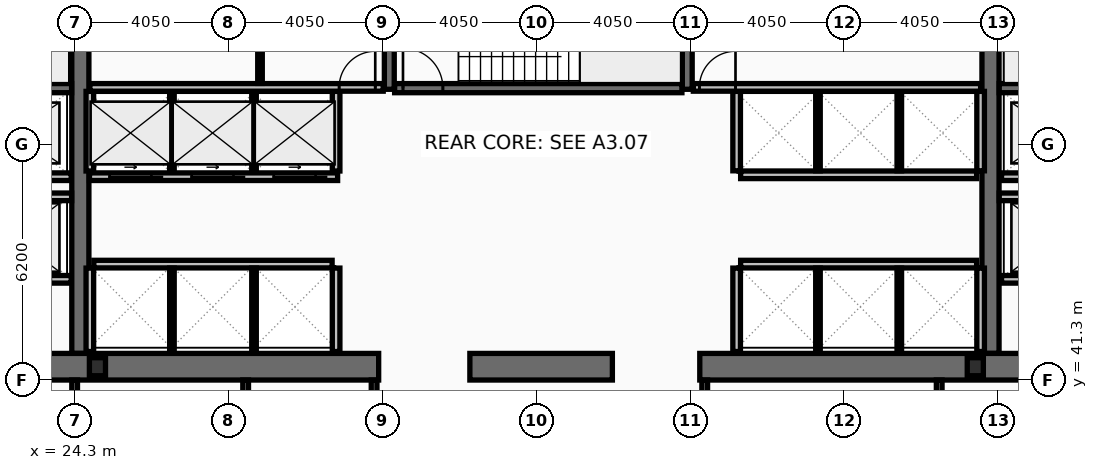
"""IFC4 building model, lengths in metres.
Left out: names, types, materials, properties, quantities, classifications, styles, units other than length and angle.
Written with IfcOpenShell. Run it as: python <this file> out.ifc"""

import sys

from ifc_helpers import new_model, si_unit, direction, frame, frame_2d, origin, origin_2d, place, context, subcontext, project, spatial, rectangle, i_section, extrude, element, fill, save


model = new_model("IFC4")
c1 = context("Model", 3, precision=1e-05, world=origin(), true_north=direction((0.0, 1.0)))
c2 = subcontext(c1, "Body", "Model", "MODEL_VIEW")
j1 = project(units=[si_unit("LENGTHUNIT", "METRE"), si_unit("PLANEANGLEUNIT", "RADIAN")], contexts=[c1])
p1 = place(None, origin())
s1 = spatial("IfcSite", under=j1, at=p1, CompositionType="ELEMENT")
p2 = place(p1, origin())
s2 = spatial("IfcBuilding", under=s1, at=p2, CompositionType="ELEMENT")
p3 = place(p2, frame((0.0, 0.0, 90.6)))
s3 = spatial("IfcBuildingStorey", under=s2, at=p3, CompositionType="ELEMENT", Elevation=90.6)
for number, where, z_axis, x_axis in (
    (1, (24.45, 42.0, 0.0), (0.0, 0.0, 1.0), (0.0, 1.0, 0.0)),
    (2, (48.4, 42.0, 0.0), (0.0, 0.0, 1.0), (0.0, 1.0, 0.0)),
):
    element("IfcWall", number, at=place(p3, frame(where, z_axis=z_axis, x_axis=x_axis)), inside=s3, PredefinedType="SHEAR", context=c2, shape_type="SweptSolid", body=[
        extrude(rectangle(XDim=11.0, YDim=0.45, at=frame_2d((5.5, 0.0))), origin(), (0.0, 0.0, 1.0), 3.82),
    ])
p4 = place(p3, frame((32.3, 41.65, 0.0), z_axis=(0.0, 0.0, 1.0), x_axis=(-1.0, 0.0, 0.0)))
e3 = element("IfcWall", 3, at=p4, inside=s3, PredefinedType="SHEAR", context=c2, shape_type="SweptSolid", body=[
    extrude(rectangle(XDim=11.45, YDim=0.7, at=frame_2d((5.725, 0.0))), origin(), (0.0, 0.0, 1.0), 3.82),
])
p5 = place(p3, frame((38.45, 41.65, 0.0), z_axis=(0.0, 0.0, 1.0), x_axis=(-1.0, 0.0, 0.0)))
e4 = element("IfcWall", 4, at=p5, inside=s3, PredefinedType="SHEAR", context=c2, shape_type="SweptSolid", body=[
    extrude(rectangle(XDim=3.75, YDim=0.7, at=frame_2d((1.875, 0.0))), origin(), (0.0, 0.0, 1.0), 3.82),
])
p6 = place(p3, frame((52.05, 41.65, 0.0), z_axis=(0.0, 0.0, 1.0), x_axis=(-1.0, 0.0, 0.0)))
e5 = element("IfcWall", 5, at=p6, inside=s3, PredefinedType="SHEAR", context=c2, shape_type="SweptSolid", body=[
    extrude(rectangle(XDim=11.3, YDim=0.7, at=frame_2d((5.65, 0.0))), origin(), (0.0, 0.0, 1.0), 3.82),
])
for number, where, z_axis, x_axis in (
    (6, (32.58, 48.95, 0.0), (0.0, 0.0, 1.0), (0.0, 1.0, 0.0)),
    (7, (40.42, 48.95, 0.0), (0.0, 0.0, 1.0), (0.0, 1.0, 0.0)),
):
    element("IfcWall", number, at=place(p3, frame(where, z_axis=z_axis, x_axis=x_axis)), inside=s3, PredefinedType="SHEAR", context=c2, shape_type="SweptSolid", body=[
        extrude(rectangle(XDim=4.05, YDim=0.26, at=frame_2d((2.025, 0.0))), origin(), (0.0, 0.0, 1.0), 3.82),
    ])
p7 = place(p3, frame((16.9, 48.98, 0.0), z_axis=(0.0, 0.0, 1.0), x_axis=(1.0, 0.0, 0.0)))
e8 = element("IfcWall", 8, at=p7, inside=s3, PredefinedType="SHEAR", context=c2, shape_type="SweptSolid", body=[
    extrude(rectangle(XDim=7.32, YDim=0.24, at=frame_2d((3.66, 0.0))), origin(), (0.0, 0.0, 1.0), 3.82),
])
p8 = place(p7, frame((0.22, 0.0, 0.0)))
e9 = element("IfcOpeningElement", 9, at=p8, cuts=e8, PredefinedType="OPENING", context=c2, shape_type="SweptSolid", body=[
    extrude(rectangle(XDim=1.05, YDim=2.15, at=frame_2d((0.525, 1.075))), frame((0.0, 0.13, 0.0), z_axis=(0.0, -1.0, 0.0), x_axis=(1.0, 0.0, 0.0)), (0.0, 0.0, 1.0), 0.26),
])
p9 = place(p3, frame((48.63, 48.98, 0.0), z_axis=(0.0, 0.0, 1.0), x_axis=(1.0, 0.0, 0.0)))
e10 = element("IfcWall", 10, at=p9, inside=s3, PredefinedType="SHEAR", context=c2, shape_type="SweptSolid", body=[
    extrude(rectangle(XDim=7.37, YDim=0.24, at=frame_2d((3.685, 0.0))), origin(), (0.0, 0.0, 1.0), 3.82),
])
p10 = place(p9, frame((6.1, 0.0, 0.0)))
e11 = element("IfcOpeningElement", 11, at=p10, cuts=e10, PredefinedType="OPENING", context=c2, shape_type="SweptSolid", body=[
    extrude(rectangle(XDim=1.05, YDim=2.15, at=frame_2d((0.525, 1.075))), frame((0.0, 0.13, 0.0), z_axis=(0.0, -1.0, 0.0), x_axis=(1.0, 0.0, 0.0)), (0.0, 0.0, 1.0), 0.26),
])
p11 = place(p3, frame((32.72, 48.98, 0.0), z_axis=(0.0, 0.0, 1.0), x_axis=(1.0, 0.0, 0.0)))
e12 = element("IfcWall", 12, at=p11, inside=s3, PredefinedType="SHEAR", context=c2, shape_type="SweptSolid", body=[
    extrude(rectangle(XDim=7.56, YDim=0.24, at=frame_2d((3.78, 0.0))), origin(), (0.0, 0.0, 1.0), 3.82),
])
p12 = place(p11, frame((0.22, 0.0, 0.0)))
e13 = element("IfcOpeningElement", 13, at=p12, cuts=e12, PredefinedType="OPENING", context=c2, shape_type="SweptSolid", body=[
    extrude(rectangle(XDim=1.05, YDim=2.15, at=frame_2d((0.525, 1.075))), frame((0.0, 0.13, 0.0), z_axis=(0.0, -1.0, 0.0), x_axis=(1.0, 0.0, 0.0)), (0.0, 0.0, 1.0), 0.26),
])
for number, where, z_axis, x_axis in (
    (14, (24.9, 41.65, 0.0), (0.0, 0.0, 1.0), (1.0, 0.0, 0.0)),
    (15, (48.0, 41.65, 0.0), (0.0, 0.0, 1.0), (1.0, 0.0, 0.0)),
):
    element("IfcColumn", number, at=place(p3, frame(where, z_axis=z_axis, x_axis=x_axis)), inside=s3, PredefinedType="COLUMN", context=c2, shape_type="SweptSolid", body=[
        extrude(i_section(OverallWidth=0.424, OverallDepth=0.474, WebThickness=0.048, FlangeThickness=0.077, at=origin_2d()), origin(), (0.0, 0.0, 1.0), 4.0),
    ])
p13 = place(p3, frame((51.61, 43.95, 0.0), z_axis=(0.0, 0.0, 1.0), x_axis=(-1.0, 0.0, 0.0)))
e16 = element("IfcWall", 16, at=p13, inside=s3, PredefinedType="PARTITIONING", context=c2, shape_type="SweptSolid", body=[
    extrude(rectangle(XDim=2.92, YDim=0.2, at=frame_2d((1.46, 0.0))), origin(), (0.0, 0.0, 1.0), 3.82),
])
p14 = place(p13, frame((0.81, 0.0, 0.0)))
e17 = element("IfcOpeningElement", 17, at=p14, cuts=e16, PredefinedType="OPENING", context=c2, shape_type="SweptSolid", body=[
    extrude(rectangle(XDim=1.3, YDim=2.18, at=frame_2d((0.65, 1.09))), frame((0.0, 0.11, 0.0), z_axis=(0.0, -1.0, 0.0), x_axis=(1.0, 0.0, 0.0)), (0.0, 0.0, 1.0), 0.22),
])
p15 = place(p3, frame((24.21, 43.95, 0.0), z_axis=(0.0, 0.0, 1.0), x_axis=(-1.0, 0.0, 0.0)))
e18 = element("IfcWall", 18, at=p15, inside=s3, PredefinedType="PARTITIONING", context=c2, shape_type="SweptSolid", body=[
    extrude(rectangle(XDim=2.97, YDim=0.2, at=frame_2d((1.485, 0.0))), origin(), (0.0, 0.0, 1.0), 3.82),
])
p16 = place(p15, frame((0.86, 0.0, 0.0)))
e19 = element("IfcOpeningElement", 19, at=p16, cuts=e18, PredefinedType="OPENING", context=c2, shape_type="SweptSolid", body=[
    extrude(rectangle(XDim=1.3, YDim=2.18, at=frame_2d((0.65, 1.09))), frame((0.0, 0.11, 0.0), z_axis=(0.0, -1.0, 0.0), x_axis=(1.0, 0.0, 0.0)), (0.0, 0.0, 1.0), 0.22),
])
p17 = place(p3, frame((51.61, 46.65, 0.0), z_axis=(0.0, 0.0, 1.0), x_axis=(-1.0, 0.0, 0.0)))
e20 = element("IfcWall", 20, at=p17, inside=s3, PredefinedType="PARTITIONING", context=c2, shape_type="SweptSolid", body=[
    extrude(rectangle(XDim=2.92, YDim=0.2, at=frame_2d((1.46, 0.0))), origin(), (0.0, 0.0, 1.0), 3.82),
])
p18 = place(p17, frame((0.86, 0.0, 0.0)))
e21 = element("IfcOpeningElement", 21, at=p18, cuts=e20, PredefinedType="OPENING", context=c2, shape_type="SweptSolid", body=[
    extrude(rectangle(XDim=1.2, YDim=2.18, at=frame_2d((0.6, 1.09))), frame((0.0, 0.11, 0.0), z_axis=(0.0, -1.0, 0.0), x_axis=(1.0, 0.0, 0.0)), (0.0, 0.0, 1.0), 0.22),
])
p19 = place(p3, frame((24.21, 46.65, 0.0), z_axis=(0.0, 0.0, 1.0), x_axis=(-1.0, 0.0, 0.0)))
e22 = element("IfcWall", 22, at=p19, inside=s3, PredefinedType="PARTITIONING", context=c2, shape_type="SweptSolid", body=[
    extrude(rectangle(XDim=2.97, YDim=0.2, at=frame_2d((1.485, 0.0))), origin(), (0.0, 0.0, 1.0), 3.82),
])
p20 = place(p19, frame((0.91, 0.0, 0.0)))
e23 = element("IfcOpeningElement", 23, at=p20, cuts=e22, PredefinedType="OPENING", context=c2, shape_type="SweptSolid", body=[
    extrude(rectangle(XDim=1.2, YDim=2.18, at=frame_2d((0.6, 1.09))), frame((0.0, 0.11, 0.0), z_axis=(0.0, -1.0, 0.0), x_axis=(1.0, 0.0, 0.0)), (0.0, 0.0, 1.0), 0.22),
])
p21 = place(p3, frame((31.22, 46.65, 0.0), z_axis=(0.0, 0.0, 1.0), x_axis=(-1.0, 0.0, 0.0)))
e24 = element("IfcWall", 24, at=p21, inside=s3, PredefinedType="PARTITIONING", context=c2, shape_type="SweptSolid", body=[
    extrude(rectangle(XDim=6.53, YDim=0.2, at=frame_2d((3.265, 0.0))), origin(), (0.0, 0.0, 1.0), 3.82),
])
p22 = place(p21, frame((4.9, 0.0, 0.0)))
e25 = element("IfcOpeningElement", 25, at=p22, cuts=e24, PredefinedType="OPENING", context=c2, shape_type="SweptSolid", body=[
    extrude(rectangle(XDim=1.1, YDim=2.18, at=frame_2d((0.55, 1.09))), frame((0.0, 0.11, 0.0), z_axis=(0.0, -1.0, 0.0), x_axis=(1.0, 0.0, 0.0)), (0.0, 0.0, 1.0), 0.22),
])
p23 = place(p21, frame((2.74, 0.0, 0.0)))
e26 = element("IfcOpeningElement", 26, at=p23, cuts=e24, PredefinedType="OPENING", context=c2, shape_type="SweptSolid", body=[
    extrude(rectangle(XDim=1.1, YDim=2.18, at=frame_2d((0.55, 1.09))), frame((0.0, 0.11, 0.0), z_axis=(0.0, -1.0, 0.0), x_axis=(1.0, 0.0, 0.0)), (0.0, 0.0, 1.0), 0.22),
])
p24 = place(p21, frame((0.58, 0.0, 0.0)))
e27 = element("IfcOpeningElement", 27, at=p24, cuts=e24, PredefinedType="OPENING", context=c2, shape_type="SweptSolid", body=[
    extrude(rectangle(XDim=1.1, YDim=2.18, at=frame_2d((0.55, 1.09))), frame((0.0, 0.11, 0.0), z_axis=(0.0, -1.0, 0.0), x_axis=(1.0, 0.0, 0.0)), (0.0, 0.0, 1.0), 0.22),
])
p25 = place(p3, frame((21.2, 46.12, 0.0), z_axis=(0.0, 0.0, 1.0), x_axis=(1.0, 0.0, 0.0)))
e28 = element("IfcWall", 28, at=p25, inside=s3, PredefinedType="PARTITIONING", context=c2, shape_type="SweptSolid", body=[
    extrude(rectangle(XDim=3.02, YDim=0.2, at=frame_2d((1.51, 0.0))), origin(), (0.0, 0.0, 1.0), 3.82),
])
p26 = place(p3, frame((48.63, 46.12, 0.0), z_axis=(0.0, 0.0, 1.0), x_axis=(1.0, 0.0, 0.0)))
e29 = element("IfcWall", 29, at=p26, inside=s3, PredefinedType="PARTITIONING", context=c2, shape_type="SweptSolid", body=[
    extrude(rectangle(XDim=3.07, YDim=0.2, at=frame_2d((1.535, 0.0))), origin(), (0.0, 0.0, 1.0), 3.82),
])
for number, where, z_axis, x_axis in (
    (30, (24.7, 46.8, 0.0), (0.0, 0.0, 1.0), (0.0, 1.0, 0.0)),
    (31, (31.18, 46.8, 0.0), (0.0, 0.0, 1.0), (0.0, 1.0, 0.0)),
):
    element("IfcWall", number, at=place(p3, frame(where, z_axis=z_axis, x_axis=x_axis)), inside=s3, PredefinedType="PARTITIONING", context=c2, shape_type="SweptSolid", body=[
        extrude(rectangle(XDim=2.095, YDim=0.2, at=frame_2d((1.047, 0.0))), origin(), (0.0, 0.0, 1.0), 3.82),
    ])
for number, where, z_axis, x_axis in (
    (32, (26.86, 46.8, 0.0), (0.0, 0.0, 1.0), (0.0, 1.0, 0.0)),
    (33, (29.02, 46.8, 0.0), (0.0, 0.0, 1.0), (0.0, 1.0, 0.0)),
):
    element("IfcWall", number, at=place(p3, frame(where, z_axis=z_axis, x_axis=x_axis)), inside=s3, PredefinedType="PARTITIONING", context=c2, shape_type="SweptSolid", body=[
        extrude(rectangle(XDim=2.095, YDim=0.12, at=frame_2d((1.047, 0.0))), origin(), (0.0, 0.0, 1.0), 3.82),
    ])
p27 = place(p3, frame((24.805, 44.35, 0.0), z_axis=(0.0, 0.0, 1.0), x_axis=(1.0, 0.0, 0.0)))
e34 = element("IfcWall", 34, at=p27, inside=s3, PredefinedType="PARTITIONING", context=c2, shape_type="SweptSolid", body=[
    extrude(rectangle(XDim=6.27, YDim=0.2, at=frame_2d((3.135, 0.0))), origin(), (0.0, 0.0, 1.0), 3.82),
])
for number, where, z_axis, x_axis in (
    (35, (24.7, 42.05, 0.0), (0.0, 0.0, 1.0), (0.0, 1.0, 0.0)),
    (36, (31.18, 42.05, 0.0), (0.0, 0.0, 1.0), (0.0, 1.0, 0.0)),
):
    element("IfcWall", number, at=place(p3, frame(where, z_axis=z_axis, x_axis=x_axis)), inside=s3, PredefinedType="PARTITIONING", context=c2, shape_type="SweptSolid", body=[
        extrude(rectangle(XDim=2.195, YDim=0.2, at=frame_2d((1.098, 0.0))), origin(), (0.0, 0.0, 1.0), 3.82),
    ])
for number, where, z_axis, x_axis in (
    (37, (26.86, 42.05, 0.0), (0.0, 0.0, 1.0), (0.0, 1.0, 0.0)),
    (38, (29.02, 42.05, 0.0), (0.0, 0.0, 1.0), (0.0, 1.0, 0.0)),
):
    element("IfcWall", number, at=place(p3, frame(where, z_axis=z_axis, x_axis=x_axis)), inside=s3, PredefinedType="PARTITIONING", context=c2, shape_type="SweptSolid", body=[
        extrude(rectangle(XDim=2.195, YDim=0.12, at=frame_2d((1.098, 0.0))), origin(), (0.0, 0.0, 1.0), 3.82),
    ])
p28 = place(p3, frame((41.825, 46.7, 0.0), z_axis=(0.0, 0.0, 1.0), x_axis=(1.0, 0.0, 0.0)))
e39 = element("IfcWall", 39, at=p28, inside=s3, PredefinedType="PARTITIONING", context=c2, shape_type="SweptSolid", body=[
    extrude(rectangle(XDim=6.21, YDim=0.2, at=frame_2d((3.105, 0.0))), origin(), (0.0, 0.0, 1.0), 3.82),
])
for number, where, z_axis, x_axis in (
    (40, (41.72, 46.805, 0.0), (0.0, 0.0, 1.0), (0.0, 1.0, 0.0)),
    (41, (48.14, 46.805, 0.0), (0.0, 0.0, 1.0), (0.0, 1.0, 0.0)),
):
    element("IfcWall", number, at=place(p3, frame(where, z_axis=z_axis, x_axis=x_axis)), inside=s3, PredefinedType="PARTITIONING", context=c2, shape_type="SweptSolid", body=[
        extrude(rectangle(XDim=2.09, YDim=0.2, at=frame_2d((1.045, 0.0))), origin(), (0.0, 0.0, 1.0), 3.82),
    ])
for number, where, z_axis, x_axis in (
    (42, (43.86, 46.805, 0.0), (0.0, 0.0, 1.0), (0.0, 1.0, 0.0)),
    (43, (46.0, 46.805, 0.0), (0.0, 0.0, 1.0), (0.0, 1.0, 0.0)),
):
    element("IfcWall", number, at=place(p3, frame(where, z_axis=z_axis, x_axis=x_axis)), inside=s3, PredefinedType="PARTITIONING", context=c2, shape_type="SweptSolid", body=[
        extrude(rectangle(XDim=2.09, YDim=0.12, at=frame_2d((1.045, 0.0))), origin(), (0.0, 0.0, 1.0), 3.82),
    ])
p29 = place(p3, frame((41.825, 44.35, 0.0), z_axis=(0.0, 0.0, 1.0), x_axis=(1.0, 0.0, 0.0)))
e44 = element("IfcWall", 44, at=p29, inside=s3, PredefinedType="PARTITIONING", context=c2, shape_type="SweptSolid", body=[
    extrude(rectangle(XDim=6.21, YDim=0.2, at=frame_2d((3.105, 0.0))), origin(), (0.0, 0.0, 1.0), 3.82),
])
for number, where, z_axis, x_axis in (
    (45, (41.72, 42.05, 0.0), (0.0, 0.0, 1.0), (0.0, 1.0, 0.0)),
    (46, (48.14, 42.05, 0.0), (0.0, 0.0, 1.0), (0.0, 1.0, 0.0)),
):
    element("IfcWall", number, at=place(p3, frame(where, z_axis=z_axis, x_axis=x_axis)), inside=s3, PredefinedType="PARTITIONING", context=c2, shape_type="SweptSolid", body=[
        extrude(rectangle(XDim=2.195, YDim=0.2, at=frame_2d((1.098, 0.0))), origin(), (0.0, 0.0, 1.0), 3.82),
    ])
for number, where, z_axis, x_axis in (
    (47, (43.86, 42.05, 0.0), (0.0, 0.0, 1.0), (0.0, 1.0, 0.0)),
    (48, (46.0, 42.05, 0.0), (0.0, 0.0, 1.0), (0.0, 1.0, 0.0)),
):
    element("IfcWall", number, at=place(p3, frame(where, z_axis=z_axis, x_axis=x_axis)), inside=s3, PredefinedType="PARTITIONING", context=c2, shape_type="SweptSolid", body=[
        extrude(rectangle(XDim=2.195, YDim=0.12, at=frame_2d((1.098, 0.0))), origin(), (0.0, 0.0, 1.0), 3.82),
    ])
p30 = place(p3, frame((24.7, 49.0, 0.0), z_axis=(0.0, 0.0, 1.0), x_axis=(1.0, 0.0, 0.0)))
e49 = element("IfcWall", 49, at=p30, inside=s3, PredefinedType="PARTITIONING", context=c2, shape_type="SweptSolid", body=[
    extrude(rectangle(XDim=7.72, YDim=0.2, at=frame_2d((3.86, 0.0))), origin(), (0.0, 0.0, 1.0), 3.82),
])
p31 = place(p30, frame((6.56, 0.0, 0.0)))
e50 = element("IfcOpeningElement", 50, at=p31, cuts=e49, PredefinedType="OPENING", context=c2, shape_type="SweptSolid", body=[
    extrude(rectangle(XDim=0.95, YDim=2.1, at=frame_2d((0.475, 1.05))), frame((0.0, 0.11, 0.0), z_axis=(0.0, -1.0, 0.0), x_axis=(1.0, 0.0, 0.0)), (0.0, 0.0, 1.0), 0.22),
])
p32 = place(p3, frame((29.177, 49.105, 0.0), z_axis=(0.0, 0.0, 1.0), x_axis=(0.0, 1.0, 0.0)))
e51 = element("IfcWall", 51, at=p32, inside=s3, PredefinedType="PARTITIONING", context=c2, shape_type="SweptSolid", body=[
    extrude(rectangle(XDim=3.69, YDim=0.12, at=frame_2d((1.845, 0.0))), origin(), (0.0, 0.0, 1.0), 3.82),
])
p33 = place(p32, frame((1.05, 0.0, 0.0)))
e52 = element("IfcOpeningElement", 52, at=p33, cuts=e51, PredefinedType="OPENING", context=c2, shape_type="SweptSolid", body=[
    extrude(rectangle(XDim=0.9, YDim=2.05, at=frame_2d((0.45, 1.025))), frame((0.0, 0.07, 0.0), z_axis=(0.0, -1.0, 0.0), x_axis=(1.0, 0.0, 0.0)), (0.0, 0.0, 1.0), 0.14),
])
p34 = place(p3, frame((40.58, 49.0, 0.0), z_axis=(0.0, 0.0, 1.0), x_axis=(1.0, 0.0, 0.0)))
e53 = element("IfcWall", 53, at=p34, inside=s3, PredefinedType="PARTITIONING", context=c2, shape_type="SweptSolid", body=[
    extrude(rectangle(XDim=7.56, YDim=0.2, at=frame_2d((3.78, 0.0))), origin(), (0.0, 0.0, 1.0), 3.82),
])
p35 = place(p34, frame((0.16, 0.0, 0.0)))
e54 = element("IfcOpeningElement", 54, at=p35, cuts=e53, PredefinedType="OPENING", context=c2, shape_type="SweptSolid", body=[
    extrude(rectangle(XDim=0.95, YDim=2.1, at=frame_2d((0.475, 1.05))), frame((0.0, 0.11, 0.0), z_axis=(0.0, -1.0, 0.0), x_axis=(1.0, 0.0, 0.0)), (0.0, 0.0, 1.0), 0.22),
])
for number, where, z_axis, x_axis in (
    (55, (24.3, 38.28, 0.0), (0.0, 0.0, 1.0), (0.0, 1.0, 0.0)),
    (56, (28.8, 38.28, 0.0), (0.0, 0.0, 1.0), (0.0, 1.0, 0.0)),
    (57, (32.18, 38.28, 0.0), (0.0, 0.0, 1.0), (0.0, 1.0, 0.0)),
    (58, (40.88, 38.28, 0.0), (0.0, 0.0, 1.0), (0.0, 1.0, 0.0)),
    (59, (47.05, 38.28, 0.0), (0.0, 0.0, 1.0), (0.0, 1.0, 0.0)),
):
    element("IfcWall", number, at=place(p3, frame(where, z_axis=z_axis, x_axis=x_axis)), inside=s3, PredefinedType="PARTITIONING", context=c2, shape_type="SweptSolid", body=[
        extrude(rectangle(XDim=3.02, YDim=0.15, at=frame_2d((1.51, 0.0))), origin(), (0.0, 0.0, 1.0), 3.82),
    ])
p36 = place(p12, origin())
e60 = element("IfcDoor", 60, at=p36, inside=s3, OperationType="SINGLE_SWING_LEFT", PredefinedType="DOOR", context=c2, shape_type="SweptSolid", body=[
    extrude(rectangle(XDim=1.05, YDim=2.15, at=frame_2d((0.525, 1.075))), frame((0.0, 0.025, 0.0), z_axis=(0.0, -1.0, 0.0), x_axis=(1.0, 0.0, 0.0)), (0.0, 0.0, 1.0), 0.05),
])
fill(e13, e60)
p37 = place(p22, origin())
e61 = element("IfcDoor", 61, at=p37, inside=s3, OperationType="SLIDING_TO_LEFT", PredefinedType="DOOR", context=c2, shape_type="SweptSolid", body=[
    extrude(rectangle(XDim=1.1, YDim=2.18, at=frame_2d((0.55, 1.09))), frame((0.0, 0.025, 0.0), z_axis=(0.0, -1.0, 0.0), x_axis=(1.0, 0.0, 0.0)), (0.0, 0.0, 1.0), 0.05),
])
fill(e25, e61)
p38 = place(p23, origin())
e62 = element("IfcDoor", 62, at=p38, inside=s3, OperationType="SLIDING_TO_LEFT", PredefinedType="DOOR", context=c2, shape_type="SweptSolid", body=[
    extrude(rectangle(XDim=1.1, YDim=2.18, at=frame_2d((0.55, 1.09))), frame((0.0, 0.025, 0.0), z_axis=(0.0, -1.0, 0.0), x_axis=(1.0, 0.0, 0.0)), (0.0, 0.0, 1.0), 0.05),
])
fill(e26, e62)
p39 = place(p24, origin())
e63 = element("IfcDoor", 63, at=p39, inside=s3, OperationType="SLIDING_TO_LEFT", PredefinedType="DOOR", context=c2, shape_type="SweptSolid", body=[
    extrude(rectangle(XDim=1.1, YDim=2.18, at=frame_2d((0.55, 1.09))), frame((0.0, 0.025, 0.0), z_axis=(0.0, -1.0, 0.0), x_axis=(1.0, 0.0, 0.0)), (0.0, 0.0, 1.0), 0.05),
])
fill(e27, e63)
p40 = place(p31, origin())
e64 = element("IfcDoor", 64, at=p40, inside=s3, OperationType="SINGLE_SWING_RIGHT", PredefinedType="DOOR", context=c2, shape_type="SweptSolid", body=[
    extrude(rectangle(XDim=0.95, YDim=2.1, at=frame_2d((0.475, 1.05))), frame((0.0, 0.025, 0.0), z_axis=(0.0, -1.0, 0.0), x_axis=(1.0, 0.0, 0.0)), (0.0, 0.0, 1.0), 0.05),
])
fill(e50, e64)
p41 = place(p35, origin())
e65 = element("IfcDoor", 65, at=p41, inside=s3, OperationType="SINGLE_SWING_RIGHT", PredefinedType="DOOR", context=c2, shape_type="SweptSolid", body=[
    extrude(rectangle(XDim=0.95, YDim=2.1, at=frame_2d((0.475, 1.05))), frame((0.0, 0.025, 0.0), z_axis=(0.0, -1.0, 0.0), x_axis=(1.0, 0.0, 0.0)), (0.0, 0.0, 1.0), 0.05),
])
fill(e54, e65)
save(model, sys.argv[1])
